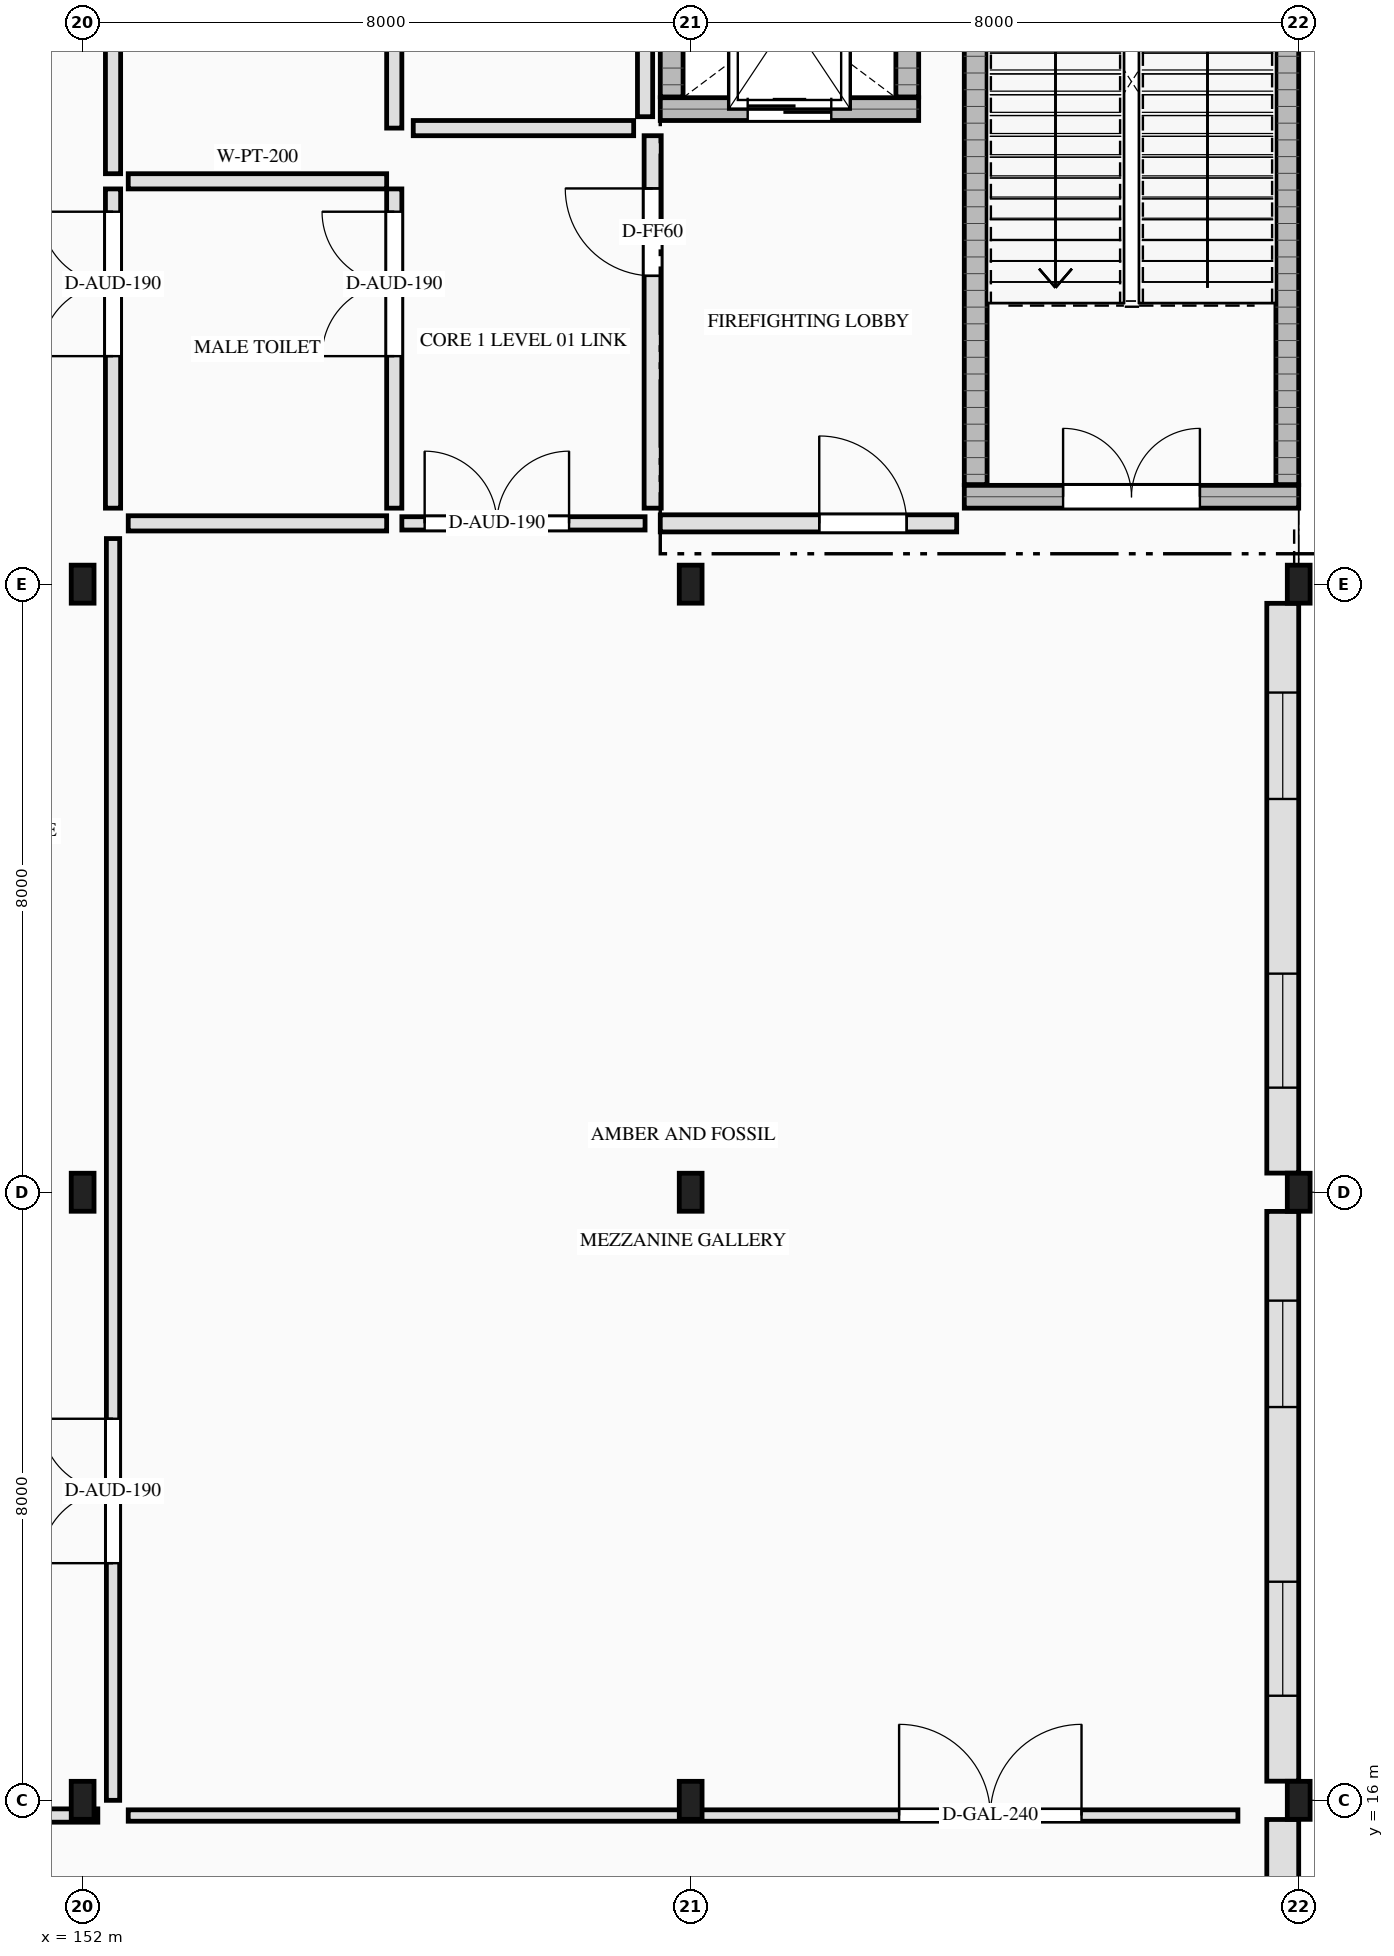
"""IFC4 building model, lengths in metres.
Left out: names, types, materials, properties, quantities, classifications, styles, units other than length and angle.
Written with IfcOpenShell. Run it as: python <this file> out.ifc"""

import sys

from ifc_helpers import new_model, si_unit, direction, frame, frame_2d, origin, origin_2d, place, context, subcontext, project, spatial, rectangle, i_section, extrude, element, fill, save


model = new_model("IFC4")
c1 = context("Model", 3, precision=1e-05, world=origin(), true_north=direction((0.0, 1.0)))
c2 = subcontext(c1, "Body", "Model", "MODEL_VIEW")
j1 = project(units=[si_unit("LENGTHUNIT", "METRE"), si_unit("PLANEANGLEUNIT", "RADIAN")], contexts=[c1])
p1 = place(None, origin())
s1 = spatial("IfcSite", under=j1, at=p1, CompositionType="ELEMENT")
p2 = place(p1, origin())
s2 = spatial("IfcBuilding", under=s1, at=p2, CompositionType="ELEMENT")
p3 = place(p2, frame((0.0, 0.0, 5.4)))
s3 = spatial("IfcBuildingStorey", under=s2, at=p3, CompositionType="ELEMENT", Elevation=5.4)
p4 = place(p3, frame((163.6, 33.15, 0.0), z_axis=(0.0, 0.0, 1.0), x_axis=(1.0, 0.0, 0.0)))
e1 = element("IfcWall", 1, at=p4, inside=s3, PredefinedType="SHEAR", context=c2, shape_type="SweptSolid", body=[
    extrude(rectangle(XDim=4.4, YDim=0.3, at=frame_2d((2.2, 0.0))), origin(), (0.0, 0.0, 1.0), 4.2),
])
p5 = place(p4, frame((1.3, 0.0, 0.0)))
e2 = element("IfcOpeningElement", 2, at=p5, cuts=e1, PredefinedType="OPENING", context=c2, shape_type="SweptSolid", body=[
    extrude(rectangle(XDim=1.8, YDim=2.2, at=frame_2d((0.9, 1.1))), frame((0.0, 0.16, 0.0), z_axis=(0.0, -1.0, 0.0), x_axis=(1.0, 0.0, 0.0)), (0.0, 0.0, 1.0), 0.32),
])
for number, where, z_axis, x_axis in (
    (3, (163.75, 33.31, 0.0), (0.0, 0.0, 1.0), (0.0, 1.0, 0.0)),
    (4, (167.85, 33.31, 0.0), (0.0, 0.0, 1.0), (0.0, 1.0, 0.0)),
):
    element("IfcWall", number, at=place(p3, frame(where, z_axis=z_axis, x_axis=x_axis)), inside=s3, PredefinedType="SHEAR", context=c2, shape_type="SweptSolid", body=[
        extrude(rectangle(XDim=9.38, YDim=0.3, at=frame_2d((4.69, 0.0))), origin(), (0.0, 0.0, 1.0), 4.2),
    ])
p6 = place(p3, frame((159.6, 38.25, 0.0), z_axis=(0.0, 0.0, 1.0), x_axis=(1.0, 0.0, 0.0)))
e5 = element("IfcWall", 5, at=p6, inside=s3, PredefinedType="SHEAR", context=c2, shape_type="SweptSolid", body=[
    extrude(rectangle(XDim=3.4, YDim=0.3, at=frame_2d((1.7, 0.0))), origin(), (0.0, 0.0, 1.0), 4.2),
])
p7 = place(p6, frame((1.15, 0.0, 0.0)))
e6 = element("IfcOpeningElement", 6, at=p7, cuts=e5, PredefinedType="OPENING", context=c2, shape_type="SweptSolid", body=[
    extrude(rectangle(XDim=1.1, YDim=2.15, at=frame_2d((0.55, 1.075))), frame((0.0, 0.16, 0.0), z_axis=(0.0, -1.0, 0.0), x_axis=(1.0, 0.0, 0.0)), (0.0, 0.0, 1.0), 0.32),
])
for number, where, z_axis, x_axis in (
    (7, (159.75, 38.41, 0.0), (0.0, 0.0, 1.0), (0.0, 1.0, 0.0)),
    (8, (162.85, 38.41, 0.0), (0.0, 0.0, 1.0), (0.0, 1.0, 0.0)),
):
    element("IfcWall", number, at=place(p3, frame(where, z_axis=z_axis, x_axis=x_axis)), inside=s3, PredefinedType="SHEAR", context=c2, shape_type="SweptSolid", body=[
        extrude(rectangle(XDim=2.08, YDim=0.3, at=frame_2d((1.04, 0.0))), origin(), (0.0, 0.0, 1.0), 4.2),
    ])
for number, where, z_axis, x_axis in (
    (9, (152.0, 16.0, 0.0), (0.0, 0.0, 1.0), (1.0, 0.0, 0.0)),
    (10, (152.0, 24.0, 0.0), (0.0, 0.0, 1.0), (1.0, 0.0, 0.0)),
    (11, (152.0, 32.0, 0.0), (0.0, 0.0, 1.0), (1.0, 0.0, 0.0)),
    (12, (160.0, 16.0, 0.0), (0.0, 0.0, 1.0), (1.0, 0.0, 0.0)),
    (13, (160.0, 24.0, 0.0), (0.0, 0.0, 1.0), (1.0, 0.0, 0.0)),
    (14, (160.0, 32.0, 0.0), (0.0, 0.0, 1.0), (1.0, 0.0, 0.0)),
    (15, (168.0, 16.0, 0.0), (0.0, 0.0, 1.0), (1.0, 0.0, 0.0)),
    (16, (168.0, 24.0, 0.0), (0.0, 0.0, 1.0), (1.0, 0.0, 0.0)),
    (17, (168.0, 32.0, 0.0), (0.0, 0.0, 1.0), (1.0, 0.0, 0.0)),
):
    element("IfcColumn", number, at=place(p3, frame(where, z_axis=z_axis, x_axis=x_axis)), inside=s3, PredefinedType="COLUMN", context=c2, shape_type="SweptSolid", body=[
        extrude(i_section(OverallWidth=0.3, OverallDepth=0.5, WebThickness=0.014, FlangeThickness=0.028, FilletRadius=0.027, at=origin_2d()), origin(), (0.0, 0.0, 1.0), 4.2),
    ])
p8 = place(p3, frame((167.79, 15.748, 0.0), z_axis=(0.0, 0.0, 1.0), x_axis=(0.0, -1.0, 0.0)))
e18 = element("IfcWall", 18, at=p8, inside=s3, PredefinedType="SOLIDWALL", context=c2, shape_type="SweptSolid", body=[
    extrude(rectangle(XDim=7.496, YDim=0.42, at=frame_2d((3.748, 0.0))), origin(), (0.0, 0.0, 1.0), 3.415),
])
p9 = place(p3, frame((167.79, 23.748, 0.0), z_axis=(0.0, 0.0, 1.0), x_axis=(0.0, -1.0, 0.0)))
e19 = element("IfcWall", 19, at=p9, inside=s3, PredefinedType="SOLIDWALL", context=c2, shape_type="SweptSolid", body=[
    extrude(rectangle(XDim=7.496, YDim=0.42, at=frame_2d((3.748, 0.0))), origin(), (0.0, 0.0, 1.0), 3.415),
])
p10 = place(p9, frame((1.174, 0.0, 0.85)))
e20 = element("IfcOpeningElement", 20, at=p10, cuts=e19, PredefinedType="OPENING", context=c2, shape_type="SweptSolid", body=[
    extrude(rectangle(XDim=1.4, YDim=1.6, at=frame_2d((0.7, 0.8))), frame((0.0, 0.22, 0.0), z_axis=(0.0, -1.0, 0.0), x_axis=(1.0, 0.0, 0.0)), (0.0, 0.0, 1.0), 0.44),
])
p11 = place(p9, frame((4.872, 0.0, 0.85)))
e21 = element("IfcOpeningElement", 21, at=p11, cuts=e19, PredefinedType="OPENING", context=c2, shape_type="SweptSolid", body=[
    extrude(rectangle(XDim=1.5, YDim=2.4, at=frame_2d((0.75, 1.2))), frame((0.0, 0.22, 0.0), z_axis=(0.0, -1.0, 0.0), x_axis=(1.0, 0.0, 0.0)), (0.0, 0.0, 1.0), 0.44),
])
p12 = place(p3, frame((167.79, 31.748, 0.0), z_axis=(0.0, 0.0, 1.0), x_axis=(0.0, -1.0, 0.0)))
e22 = element("IfcWall", 22, at=p12, inside=s3, PredefinedType="SOLIDWALL", context=c2, shape_type="SweptSolid", body=[
    extrude(rectangle(XDim=7.496, YDim=0.42, at=frame_2d((3.748, 0.0))), origin(), (0.0, 0.0, 1.0), 3.415),
])
p13 = place(p12, frame((1.174, 0.0, 0.85)))
e23 = element("IfcOpeningElement", 23, at=p13, cuts=e22, PredefinedType="OPENING", context=c2, shape_type="SweptSolid", body=[
    extrude(rectangle(XDim=1.4, YDim=1.6, at=frame_2d((0.7, 0.8))), frame((0.0, 0.22, 0.0), z_axis=(0.0, -1.0, 0.0), x_axis=(1.0, 0.0, 0.0)), (0.0, 0.0, 1.0), 0.44),
])
p14 = place(p12, frame((4.872, 0.0, 0.85)))
e24 = element("IfcOpeningElement", 24, at=p14, cuts=e22, PredefinedType="OPENING", context=c2, shape_type="SweptSolid", body=[
    extrude(rectangle(XDim=1.5, YDim=2.4, at=frame_2d((0.75, 1.2))), frame((0.0, 0.22, 0.0), z_axis=(0.0, -1.0, 0.0), x_axis=(1.0, 0.0, 0.0)), (0.0, 0.0, 1.0), 0.44),
])
p15 = place(p3, frame((159.5, 33.0, 0.0), z_axis=(0.0, 0.0, 1.0), x_axis=(0.0, 1.0, 0.0)))
e25 = element("IfcWall", 25, at=p15, inside=s3, PredefinedType="SOLIDWALL", context=c2, shape_type="SweptSolid", body=[
    extrude(rectangle(XDim=4.9, YDim=0.225, at=frame_2d((2.45, 0.0))), origin(), (0.0, 0.0, 1.0), 3.92),
])
p16 = place(p15, frame((3.056, 0.0, 0.0)))
e26 = element("IfcOpeningElement", 26, at=p16, cuts=e25, PredefinedType="OPENING", context=c2, shape_type="SweptSolid", body=[
    extrude(rectangle(XDim=1.15, YDim=2.2, at=frame_2d((0.575, 1.1))), frame((0.0, 0.123, 0.0), z_axis=(0.0, -1.0, 0.0), x_axis=(1.0, 0.0, 0.0)), (0.0, 0.0, 1.0), 0.245),
])
p17 = place(p3, frame((159.6, 32.8, 0.0), z_axis=(0.0, 0.0, 1.0), x_axis=(1.0, 0.0, 0.0)))
e27 = element("IfcWall", 27, at=p17, inside=s3, PredefinedType="SOLIDWALL", context=c2, shape_type="SweptSolid", body=[
    extrude(rectangle(XDim=3.9, YDim=0.225, at=frame_2d((1.95, 0.0))), origin(), (0.0, 0.0, 1.0), 3.92),
])
p18 = place(p17, frame((2.092, 0.0, 0.0)))
e28 = element("IfcOpeningElement", 28, at=p18, cuts=e27, PredefinedType="OPENING", context=c2, shape_type="SweptSolid", body=[
    extrude(rectangle(XDim=1.15, YDim=2.2, at=frame_2d((0.575, 1.1))), frame((0.0, 0.123, 0.0), z_axis=(0.0, -1.0, 0.0), x_axis=(1.0, 0.0, 0.0)), (0.0, 0.0, 1.0), 0.245),
])
p19 = place(p3, frame((152.6, 37.3, 0.0), z_axis=(0.0, 0.0, 1.0), x_axis=(1.0, 0.0, 0.0)))
e29 = element("IfcWall", 29, at=p19, inside=s3, PredefinedType="PARTITIONING", context=c2, shape_type="SweptSolid", body=[
    extrude(rectangle(XDim=3.4, YDim=0.2, at=frame_2d((1.7, 0.0))), origin(), (0.0, 0.0, 1.0), 3.92),
])
p20 = place(p3, frame((152.4, 33.0, 0.0), z_axis=(0.0, 0.0, 1.0), x_axis=(0.0, 1.0, 0.0)))
e30 = element("IfcWall", 30, at=p20, inside=s3, PredefinedType="PARTITIONING", context=c2, shape_type="SweptSolid", body=[
    extrude(rectangle(XDim=4.2, YDim=0.2, at=frame_2d((2.1, 0.0))), origin(), (0.0, 0.0, 1.0), 3.92),
])
p21 = place(p20, frame((2.0, 0.0, 0.0)))
e31 = element("IfcOpeningElement", 31, at=p21, cuts=e30, PredefinedType="OPENING", context=c2, shape_type="SweptSolid", body=[
    extrude(rectangle(XDim=1.9, YDim=2.35, at=frame_2d((0.95, 1.175))), frame((0.0, 0.11, 0.0), z_axis=(0.0, -1.0, 0.0), x_axis=(1.0, 0.0, 0.0)), (0.0, 0.0, 1.0), 0.22),
])
p22 = place(p3, frame((156.1, 33.0, 0.0), z_axis=(0.0, 0.0, 1.0), x_axis=(0.0, 1.0, 0.0)))
e32 = element("IfcWall", 32, at=p22, inside=s3, PredefinedType="PARTITIONING", context=c2, shape_type="SweptSolid", body=[
    extrude(rectangle(XDim=4.2, YDim=0.2, at=frame_2d((2.1, 0.0))), origin(), (0.0, 0.0, 1.0), 3.92),
])
p23 = place(p22, frame((2.0, 0.0, 0.0)))
e33 = element("IfcOpeningElement", 33, at=p23, cuts=e32, PredefinedType="OPENING", context=c2, shape_type="SweptSolid", body=[
    extrude(rectangle(XDim=1.9, YDim=2.35, at=frame_2d((0.95, 1.175))), frame((0.0, 0.11, 0.0), z_axis=(0.0, -1.0, 0.0), x_axis=(1.0, 0.0, 0.0)), (0.0, 0.0, 1.0), 0.22),
])
p24 = place(p3, frame((152.6, 32.8, 0.0), z_axis=(0.0, 0.0, 1.0), x_axis=(1.0, 0.0, 0.0)))
e34 = element("IfcWall", 34, at=p24, inside=s3, PredefinedType="PARTITIONING", context=c2, shape_type="SweptSolid", body=[
    extrude(rectangle(XDim=3.4, YDim=0.2, at=frame_2d((1.7, 0.0))), origin(), (0.0, 0.0, 1.0), 3.92),
])
p25 = place(p3, frame((156.1, 38.0, 0.0), z_axis=(0.0, 0.0, 1.0), x_axis=(0.0, 1.0, 0.0)))
e35 = element("IfcWall", 35, at=p25, inside=s3, PredefinedType="PARTITIONING", context=c2, shape_type="SweptSolid", body=[
    extrude(rectangle(XDim=3.6, YDim=0.2, at=frame_2d((1.8, 0.0))), origin(), (0.0, 0.0, 1.0), 3.92),
])
p26 = place(p3, frame((152.4, 37.4, 0.0), z_axis=(0.0, 0.0, 1.0), x_axis=(0.0, 1.0, 0.0)))
e36 = element("IfcWall", 36, at=p26, inside=s3, PredefinedType="PARTITIONING", context=c2, shape_type="SweptSolid", body=[
    extrude(rectangle(XDim=4.2, YDim=0.2, at=frame_2d((2.1, 0.0))), origin(), (0.0, 0.0, 1.0), 3.92),
])
p27 = place(p3, frame((149.0, 15.8, 0.0), z_axis=(0.0, 0.0, 1.0), x_axis=(1.0, 0.0, 0.0)))
e37 = element("IfcWall", 37, at=p27, inside=s3, PredefinedType="PARTITIONING", context=c2, shape_type="SweptSolid", body=[
    extrude(rectangle(XDim=3.2, YDim=0.175, at=frame_2d((1.6, 0.0))), origin(), (0.0, 0.0, 1.0), 3.38),
])
p28 = place(p3, frame((152.4, 16.0, 0.0), z_axis=(0.0, 0.0, 1.0), x_axis=(0.0, 1.0, 0.0)))
e38 = element("IfcWall", 38, at=p28, inside=s3, PredefinedType="PARTITIONING", context=c2, shape_type="SweptSolid", body=[
    extrude(rectangle(XDim=16.6, YDim=0.175, at=frame_2d((8.3, 0.0))), origin(), (0.0, 0.0, 1.0), 3.92),
])
p29 = place(p28, frame((3.12, 0.0, 0.0)))
e39 = element("IfcOpeningElement", 39, at=p29, cuts=e38, PredefinedType="OPENING", context=c2, shape_type="SweptSolid", body=[
    extrude(rectangle(XDim=1.9, YDim=2.35, at=frame_2d((0.95, 1.175))), frame((0.0, 0.097, 0.0), z_axis=(0.0, -1.0, 0.0), x_axis=(1.0, 0.0, 0.0)), (0.0, 0.0, 1.0), 0.195),
])
p30 = place(p3, frame((156.2, 32.8, 0.0), z_axis=(0.0, 0.0, 1.0), x_axis=(1.0, 0.0, 0.0)))
e40 = element("IfcWall", 40, at=p30, inside=s3, PredefinedType="PARTITIONING", context=c2, shape_type="SweptSolid", body=[
    extrude(rectangle(XDim=3.2, YDim=0.175, at=frame_2d((1.6, 0.0))), origin(), (0.0, 0.0, 1.0), 3.92),
])
p31 = place(p30, frame((0.3, 0.0, 0.0)))
e41 = element("IfcOpeningElement", 41, at=p31, cuts=e40, PredefinedType="OPENING", context=c2, shape_type="SweptSolid", body=[
    extrude(rectangle(XDim=1.9, YDim=2.35, at=frame_2d((0.95, 1.175))), frame((0.0, 0.097, 0.0), z_axis=(0.0, -1.0, 0.0), x_axis=(1.0, 0.0, 0.0)), (0.0, 0.0, 1.0), 0.195),
])
p32 = place(p3, frame((152.6, 15.8, 0.0), z_axis=(0.0, 0.0, 1.0), x_axis=(1.0, 0.0, 0.0)))
e42 = element("IfcWall", 42, at=p32, inside=s3, PredefinedType="PARTITIONING", context=c2, shape_type="SweptSolid", body=[
    extrude(rectangle(XDim=14.6, YDim=0.15, at=frame_2d((7.3, 0.0))), origin(), (0.0, 0.0, 1.0), 3.38),
])
p33 = place(p32, frame((10.142, 0.0, 0.0)))
e43 = element("IfcOpeningElement", 43, at=p33, cuts=e42, PredefinedType="OPENING", context=c2, shape_type="SweptSolid", body=[
    extrude(rectangle(XDim=2.4, YDim=2.75, at=frame_2d((1.2, 1.375))), frame((0.0, 0.085, 0.0), z_axis=(0.0, -1.0, 0.0), x_axis=(1.0, 0.0, 0.0)), (0.0, 0.0, 1.0), 0.17),
])
p34 = place(p3, frame((156.35, 38.0, 0.0), z_axis=(0.0, 0.0, 1.0), x_axis=(1.0, 0.0, 0.0)))
e44 = element("IfcWall", 44, at=p34, inside=s3, PredefinedType="PARTITIONING", context=c2, shape_type="SweptSolid", body=[
    extrude(rectangle(XDim=2.9, YDim=0.2, at=frame_2d((1.45, 0.0))), origin(), (0.0, 0.0, 1.0), 3.92),
])
p35 = place(p3, frame((159.4, 38.15, 0.0), z_axis=(0.0, 0.0, 1.0), x_axis=(0.0, 1.0, 0.0)))
e45 = element("IfcWall", 45, at=p35, inside=s3, PredefinedType="PARTITIONING", context=c2, shape_type="SweptSolid", body=[
    extrude(rectangle(XDim=3.3, YDim=0.2, at=frame_2d((1.65, 0.0))), origin(), (0.0, 0.0, 1.0), 3.92),
])
p36 = place(p10, origin())
e46 = element("IfcWindow", 46, at=p36, inside=s3, PartitioningType="SINGLE_PANEL", PredefinedType="WINDOW", context=c2, shape_type="SweptSolid", body=[
    extrude(rectangle(XDim=1.4, YDim=1.6, at=frame_2d((0.7, 0.8))), frame((0.0, 0.03, 0.0), z_axis=(0.0, -1.0, 0.0), x_axis=(1.0, 0.0, 0.0)), (0.0, 0.0, 1.0), 0.06),
])
fill(e20, e46)
p37 = place(p11, origin())
e47 = element("IfcWindow", 47, at=p37, inside=s3, PartitioningType="SINGLE_PANEL", PredefinedType="WINDOW", context=c2, shape_type="SweptSolid", body=[
    extrude(rectangle(XDim=1.5, YDim=2.4, at=frame_2d((0.75, 1.2))), frame((0.0, 0.03, 0.0), z_axis=(0.0, -1.0, 0.0), x_axis=(1.0, 0.0, 0.0)), (0.0, 0.0, 1.0), 0.06),
])
fill(e21, e47)
p38 = place(p13, origin())
e48 = element("IfcWindow", 48, at=p38, inside=s3, PartitioningType="SINGLE_PANEL", PredefinedType="WINDOW", context=c2, shape_type="SweptSolid", body=[
    extrude(rectangle(XDim=1.4, YDim=1.6, at=frame_2d((0.7, 0.8))), frame((0.0, 0.03, 0.0), z_axis=(0.0, -1.0, 0.0), x_axis=(1.0, 0.0, 0.0)), (0.0, 0.0, 1.0), 0.06),
])
fill(e23, e48)
p39 = place(p14, origin())
e49 = element("IfcWindow", 49, at=p39, inside=s3, PartitioningType="SINGLE_PANEL", PredefinedType="WINDOW", context=c2, shape_type="SweptSolid", body=[
    extrude(rectangle(XDim=1.5, YDim=2.4, at=frame_2d((0.75, 1.2))), frame((0.0, 0.03, 0.0), z_axis=(0.0, -1.0, 0.0), x_axis=(1.0, 0.0, 0.0)), (0.0, 0.0, 1.0), 0.06),
])
fill(e24, e49)
p40 = place(p5, origin())
e50 = element("IfcDoor", 50, at=p40, inside=s3, OperationType="DOUBLE_DOOR_SINGLE_SWING", PredefinedType="DOOR", context=c2, shape_type="SweptSolid", body=[
    extrude(rectangle(XDim=1.8, YDim=2.2, at=frame_2d((0.9, 1.1))), frame((0.0, 0.025, 0.0), z_axis=(0.0, -1.0, 0.0), x_axis=(1.0, 0.0, 0.0)), (0.0, 0.0, 1.0), 0.05),
])
fill(e2, e50)
p41 = place(p7, origin())
e51 = element("IfcDoor", 51, at=p41, inside=s3, OperationType="SLIDING_TO_LEFT", PredefinedType="DOOR", context=c2, shape_type="SweptSolid", body=[
    extrude(rectangle(XDim=1.1, YDim=2.15, at=frame_2d((0.55, 1.075))), frame((0.0, 0.025, 0.0), z_axis=(0.0, -1.0, 0.0), x_axis=(1.0, 0.0, 0.0)), (0.0, 0.0, 1.0), 0.05),
])
fill(e6, e51)
p42 = place(p16, origin())
e52 = element("IfcDoor", 52, at=p42, inside=s3, OperationType="SINGLE_SWING_RIGHT", PredefinedType="DOOR", context=c2, shape_type="SweptSolid", body=[
    extrude(rectangle(XDim=1.15, YDim=2.2, at=frame_2d((0.575, 1.1))), frame((0.0, 0.025, 0.0), z_axis=(0.0, -1.0, 0.0), x_axis=(1.0, 0.0, 0.0)), (0.0, 0.0, 1.0), 0.05),
])
fill(e26, e52)
p43 = place(p18, origin())
e53 = element("IfcDoor", 53, at=p43, inside=s3, OperationType="SINGLE_SWING_LEFT", PredefinedType="DOOR", context=c2, shape_type="SweptSolid", body=[
    extrude(rectangle(XDim=1.15, YDim=2.2, at=frame_2d((0.575, 1.1))), frame((0.0, 0.025, 0.0), z_axis=(0.0, -1.0, 0.0), x_axis=(1.0, 0.0, 0.0)), (0.0, 0.0, 1.0), 0.05),
])
fill(e28, e53)
p44 = place(p21, origin())
e54 = element("IfcDoor", 54, at=p44, inside=s3, OperationType="DOUBLE_DOOR_SINGLE_SWING", PredefinedType="DOOR", context=c2, shape_type="SweptSolid", body=[
    extrude(rectangle(XDim=1.9, YDim=2.35, at=frame_2d((0.95, 1.175))), frame((0.0, 0.025, 0.0), z_axis=(0.0, -1.0, 0.0), x_axis=(1.0, 0.0, 0.0)), (0.0, 0.0, 1.0), 0.05),
])
fill(e31, e54)
p45 = place(p23, origin())
e55 = element("IfcDoor", 55, at=p45, inside=s3, OperationType="DOUBLE_DOOR_SINGLE_SWING", PredefinedType="DOOR", context=c2, shape_type="SweptSolid", body=[
    extrude(rectangle(XDim=1.9, YDim=2.35, at=frame_2d((0.95, 1.175))), frame((0.0, 0.025, 0.0), z_axis=(0.0, -1.0, 0.0), x_axis=(1.0, 0.0, 0.0)), (0.0, 0.0, 1.0), 0.05),
])
fill(e33, e55)
p46 = place(p29, origin())
e56 = element("IfcDoor", 56, at=p46, inside=s3, OperationType="DOUBLE_DOOR_SINGLE_SWING", PredefinedType="DOOR", context=c2, shape_type="SweptSolid", body=[
    extrude(rectangle(XDim=1.9, YDim=2.35, at=frame_2d((0.95, 1.175))), frame((0.0, 0.025, 0.0), z_axis=(0.0, -1.0, 0.0), x_axis=(1.0, 0.0, 0.0)), (0.0, 0.0, 1.0), 0.05),
])
fill(e39, e56)
p47 = place(p31, origin())
e57 = element("IfcDoor", 57, at=p47, inside=s3, OperationType="DOUBLE_DOOR_SINGLE_SWING", PredefinedType="DOOR", context=c2, shape_type="SweptSolid", body=[
    extrude(rectangle(XDim=1.9, YDim=2.35, at=frame_2d((0.95, 1.175))), frame((0.0, 0.025, 0.0), z_axis=(0.0, -1.0, 0.0), x_axis=(1.0, 0.0, 0.0)), (0.0, 0.0, 1.0), 0.05),
])
fill(e41, e57)
p48 = place(p33, origin())
e58 = element("IfcDoor", 58, at=p48, inside=s3, OperationType="DOUBLE_DOOR_DOUBLE_SWING", PredefinedType="DOOR", context=c2, shape_type="SweptSolid", body=[
    extrude(rectangle(XDim=2.4, YDim=2.75, at=frame_2d((1.2, 1.375))), frame((0.0, 0.025, 0.0), z_axis=(0.0, -1.0, 0.0), x_axis=(1.0, 0.0, 0.0)), (0.0, 0.0, 1.0), 0.05),
])
fill(e43, e58)
save(model, sys.argv[1])
